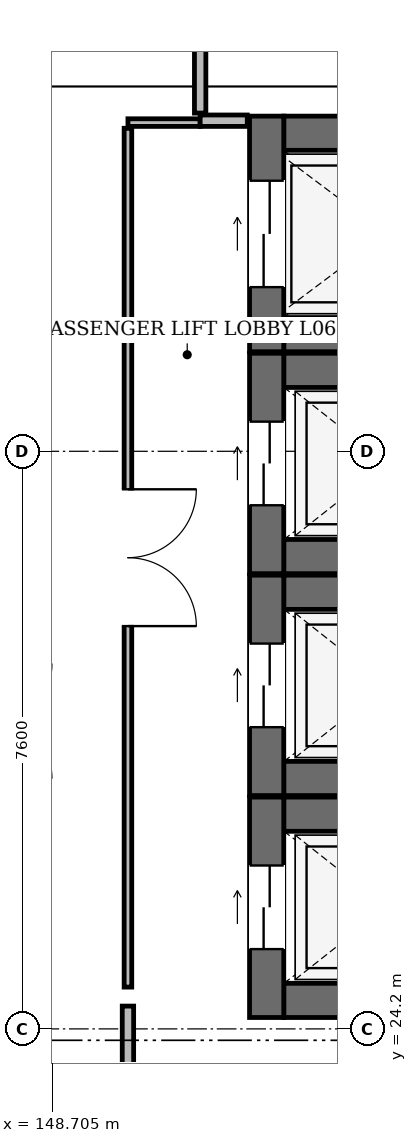
"""IFC4 building model, lengths in metres.
Left out: names, types, materials, properties, quantities, classifications, styles, units other than length and angle.
Written with IfcOpenShell. Run it as: python <this file> out.ifc"""

import sys

from ifc_helpers import new_model, si_unit, direction, frame, frame_2d, origin, place, context, subcontext, project, spatial, rectangle, extrude, element, fill, save


model = new_model("IFC4")
c1 = context("Model", 3, precision=1e-05, world=origin(), true_north=direction((0.0, 1.0)))
c2 = subcontext(c1, "Body", "Model", "MODEL_VIEW")
j1 = project(units=[si_unit("LENGTHUNIT", "METRE"), si_unit("PLANEANGLEUNIT", "RADIAN")], contexts=[c1])
p1 = place(None, origin())
s1 = spatial("IfcSite", under=j1, at=p1, CompositionType="ELEMENT")
p2 = place(p1, origin())
s2 = spatial("IfcBuilding", under=s1, at=p2, CompositionType="ELEMENT")
p3 = place(p2, frame((0.0, 0.0, 28.2)))
s3 = spatial("IfcBuildingStorey", under=s2, at=p3, CompositionType="ELEMENT", Elevation=28.2)
for number, where, z_axis, x_axis in (
    (1, (151.75, 24.575, 0.0), (0.0, 0.0, 1.0), (1.0, 0.0, 0.0)),
    (2, (151.75, 27.025, 0.0), (0.0, 0.0, 1.0), (1.0, 0.0, 0.0)),
):
    element("IfcWall", number, at=place(p3, frame(where, z_axis=z_axis, x_axis=x_axis)), inside=s3, PredefinedType="SHEAR", context=c2, shape_type="SweptSolid", body=[
        extrude(rectangle(XDim=2.7, YDim=0.45, at=frame_2d((1.35, 0.0))), origin(), (0.0, 0.0, 1.0), 3.94),
    ])
p4 = place(p3, frame((151.525, 24.35, 0.0), z_axis=(0.0, 0.0, 1.0), x_axis=(0.0, 1.0, 0.0)))
e3 = element("IfcWall", 3, at=p4, inside=s3, PredefinedType="SHEAR", context=c2, shape_type="SweptSolid", body=[
    extrude(rectangle(XDim=2.9, YDim=0.45, at=frame_2d((1.45, 0.0))), origin(), (0.0, 0.0, 1.0), 3.94),
])
p5 = place(p4, frame((0.9, 0.0, 0.0)))
e4 = element("IfcOpeningElement", 4, at=p5, cuts=e3, PredefinedType="OPENING", context=c2, shape_type="SweptSolid", body=[
    extrude(rectangle(XDim=1.1, YDim=2.2, at=frame_2d((0.55, 1.1))), frame((0.0, 0.237, 0.0), z_axis=(0.0, -1.0, 0.0), x_axis=(1.0, 0.0, 0.0)), (0.0, 0.0, 1.0), 0.474),
])
for number, where, z_axis, x_axis in (
    (5, (151.75, 27.495, 0.0), (0.0, 0.0, 1.0), (1.0, 0.0, 0.0)),
    (6, (151.75, 29.945, 0.0), (0.0, 0.0, 1.0), (1.0, 0.0, 0.0)),
):
    element("IfcWall", number, at=place(p3, frame(where, z_axis=z_axis, x_axis=x_axis)), inside=s3, PredefinedType="SHEAR", context=c2, shape_type="SweptSolid", body=[
        extrude(rectangle(XDim=2.7, YDim=0.45, at=frame_2d((1.35, 0.0))), origin(), (0.0, 0.0, 1.0), 3.94),
    ])
p6 = place(p3, frame((151.525, 27.27, 0.0), z_axis=(0.0, 0.0, 1.0), x_axis=(0.0, 1.0, 0.0)))
e7 = element("IfcWall", 7, at=p6, inside=s3, PredefinedType="SHEAR", context=c2, shape_type="SweptSolid", body=[
    extrude(rectangle(XDim=2.9, YDim=0.45, at=frame_2d((1.45, 0.0))), origin(), (0.0, 0.0, 1.0), 3.94),
])
p7 = place(p6, frame((0.9, 0.0, 0.0)))
e8 = element("IfcOpeningElement", 8, at=p7, cuts=e7, PredefinedType="OPENING", context=c2, shape_type="SweptSolid", body=[
    extrude(rectangle(XDim=1.1, YDim=2.2, at=frame_2d((0.55, 1.1))), frame((0.0, 0.237, 0.0), z_axis=(0.0, -1.0, 0.0), x_axis=(1.0, 0.0, 0.0)), (0.0, 0.0, 1.0), 0.474),
])
for number, where, z_axis, x_axis in (
    (9, (151.75, 30.415, 0.0), (0.0, 0.0, 1.0), (1.0, 0.0, 0.0)),
    (10, (151.75, 32.865, 0.0), (0.0, 0.0, 1.0), (1.0, 0.0, 0.0)),
):
    element("IfcWall", number, at=place(p3, frame(where, z_axis=z_axis, x_axis=x_axis)), inside=s3, PredefinedType="SHEAR", context=c2, shape_type="SweptSolid", body=[
        extrude(rectangle(XDim=2.7, YDim=0.45, at=frame_2d((1.35, 0.0))), origin(), (0.0, 0.0, 1.0), 3.94),
    ])
p8 = place(p3, frame((151.525, 30.19, 0.0), z_axis=(0.0, 0.0, 1.0), x_axis=(0.0, 1.0, 0.0)))
e11 = element("IfcWall", 11, at=p8, inside=s3, PredefinedType="SHEAR", context=c2, shape_type="SweptSolid", body=[
    extrude(rectangle(XDim=2.9, YDim=0.45, at=frame_2d((1.45, 0.0))), origin(), (0.0, 0.0, 1.0), 3.94),
])
p9 = place(p8, frame((0.9, 0.0, 0.0)))
e12 = element("IfcOpeningElement", 12, at=p9, cuts=e11, PredefinedType="OPENING", context=c2, shape_type="SweptSolid", body=[
    extrude(rectangle(XDim=1.1, YDim=2.2, at=frame_2d((0.55, 1.1))), frame((0.0, 0.237, 0.0), z_axis=(0.0, -1.0, 0.0), x_axis=(1.0, 0.0, 0.0)), (0.0, 0.0, 1.0), 0.474),
])
for number, where, z_axis, x_axis in (
    (13, (151.75, 33.335, 0.0), (0.0, 0.0, 1.0), (1.0, 0.0, 0.0)),
    (14, (151.75, 35.985, 0.0), (0.0, 0.0, 1.0), (1.0, 0.0, 0.0)),
):
    element("IfcWall", number, at=place(p3, frame(where, z_axis=z_axis, x_axis=x_axis)), inside=s3, PredefinedType="SHEAR", context=c2, shape_type="SweptSolid", body=[
        extrude(rectangle(XDim=2.7, YDim=0.45, at=frame_2d((1.35, 0.0))), origin(), (0.0, 0.0, 1.0), 3.94),
    ])
p10 = place(p3, frame((151.525, 33.11, 0.0), z_axis=(0.0, 0.0, 1.0), x_axis=(0.0, 1.0, 0.0)))
e15 = element("IfcWall", 15, at=p10, inside=s3, PredefinedType="SHEAR", context=c2, shape_type="SweptSolid", body=[
    extrude(rectangle(XDim=3.1, YDim=0.45, at=frame_2d((1.55, 0.0))), origin(), (0.0, 0.0, 1.0), 3.94),
])
p11 = place(p10, frame((0.85, 0.0, 0.0)))
e16 = element("IfcOpeningElement", 16, at=p11, cuts=e15, PredefinedType="OPENING", context=c2, shape_type="SweptSolid", body=[
    extrude(rectangle(XDim=1.4, YDim=2.3, at=frame_2d((0.7, 1.15))), frame((0.0, 0.237, 0.0), z_axis=(0.0, -1.0, 0.0), x_axis=(1.0, 0.0, 0.0)), (0.0, 0.0, 1.0), 0.474),
])
p12 = place(p3, frame((149.7, 24.75, 0.0), z_axis=(0.0, 0.0, 1.0), x_axis=(0.0, 1.0, 0.0)))
e17 = element("IfcWall", 17, at=p12, inside=s3, PredefinedType="PARTITIONING", context=c2, shape_type="SweptSolid", body=[
    extrude(rectangle(XDim=11.3, YDim=0.1, at=frame_2d((5.65, 0.0))), origin(), (0.0, 0.0, 1.0), 3.805),
])
p13 = place(p12, frame((4.75, 0.0, 0.0)))
e18 = element("IfcOpeningElement", 18, at=p13, cuts=e17, PredefinedType="OPENING", context=c2, shape_type="SweptSolid", body=[
    extrude(rectangle(XDim=1.8, YDim=2.4, at=frame_2d((0.9, 1.2))), frame((0.0, 0.062, 0.0), z_axis=(0.0, -1.0, 0.0), x_axis=(1.0, 0.0, 0.0)), (0.0, 0.0, 1.0), 0.124),
])
p14 = place(p3, frame((149.7, 36.125, 0.0), z_axis=(0.0, 0.0, 1.0), x_axis=(1.0, 0.0, 0.0)))
e19 = element("IfcWall", 19, at=p14, inside=s3, PredefinedType="PARTITIONING", context=c2, shape_type="SweptSolid", body=[
    extrude(rectangle(XDim=0.95, YDim=0.1, at=frame_2d((0.475, 0.0))), origin(), (0.0, 0.0, 1.0), 3.805),
])
p15 = place(p3, frame((150.65, 36.15, 0.0), z_axis=(0.0, 0.0, 1.0), x_axis=(1.0, 0.0, 0.0)))
e20 = element("IfcWall", 20, at=p15, inside=s3, PredefinedType="PARTITIONING", context=c2, shape_type="SweptSolid", body=[
    extrude(rectangle(XDim=0.62, YDim=0.15, at=frame_2d((0.31, 0.0))), origin(), (0.0, 0.0, 1.0), 3.805),
])
p16 = place(p3, frame((149.7, 24.5, 0.0), z_axis=(0.0, 0.0, 1.0), x_axis=(0.0, -1.0, 0.0)))
e21 = element("IfcWall", 21, at=p16, inside=s3, PredefinedType="PARTITIONING", context=c2, shape_type="SweptSolid", body=[
    extrude(rectangle(XDim=0.8, YDim=0.15, at=frame_2d((0.4, 0.0))), origin(), (0.0, 0.0, 1.0), 3.805),
])
p17 = place(p3, frame((150.65, 62.2, 0.0), z_axis=(0.0, 0.0, 1.0), x_axis=(0.0, -1.0, 0.0)))
e22 = element("IfcWall", 22, at=p17, inside=s3, PredefinedType="PARTITIONING", context=c2, shape_type="SweptSolid", body=[
    extrude(rectangle(XDim=25.95, YDim=0.15, at=frame_2d((12.975, 0.0))), origin(), (0.0, 0.0, 1.0), 3.805),
])
p18 = place(p17, frame((12.275, 0.0, 0.0)))
e23 = element("IfcOpeningElement", 23, at=p18, cuts=e22, PredefinedType="OPENING", context=c2, shape_type="SweptSolid", body=[
    extrude(rectangle(XDim=1.4, YDim=2.2, at=frame_2d((0.7, 1.1))), frame((0.0, 0.087, 0.0), z_axis=(0.0, -1.0, 0.0), x_axis=(1.0, 0.0, 0.0)), (0.0, 0.0, 1.0), 0.174),
])
p19 = place(p5, origin())
e24 = element("IfcDoor", 24, at=p19, inside=s3, OperationType="DOUBLE_DOOR_SLIDING", PredefinedType="DOOR", context=c2, shape_type="SweptSolid", body=[
    extrude(rectangle(XDim=1.1, YDim=2.2, at=frame_2d((0.55, 1.1))), frame((0.0, 0.025, 0.0), z_axis=(0.0, -1.0, 0.0), x_axis=(1.0, 0.0, 0.0)), (0.0, 0.0, 1.0), 0.05),
])
fill(e4, e24)
p20 = place(p7, origin())
e25 = element("IfcDoor", 25, at=p20, inside=s3, OperationType="DOUBLE_DOOR_SLIDING", PredefinedType="DOOR", context=c2, shape_type="SweptSolid", body=[
    extrude(rectangle(XDim=1.1, YDim=2.2, at=frame_2d((0.55, 1.1))), frame((0.0, 0.025, 0.0), z_axis=(0.0, -1.0, 0.0), x_axis=(1.0, 0.0, 0.0)), (0.0, 0.0, 1.0), 0.05),
])
fill(e8, e25)
p21 = place(p9, origin())
e26 = element("IfcDoor", 26, at=p21, inside=s3, OperationType="DOUBLE_DOOR_SLIDING", PredefinedType="DOOR", context=c2, shape_type="SweptSolid", body=[
    extrude(rectangle(XDim=1.1, YDim=2.2, at=frame_2d((0.55, 1.1))), frame((0.0, 0.025, 0.0), z_axis=(0.0, -1.0, 0.0), x_axis=(1.0, 0.0, 0.0)), (0.0, 0.0, 1.0), 0.05),
])
fill(e12, e26)
p22 = place(p11, origin())
e27 = element("IfcDoor", 27, at=p22, inside=s3, OperationType="DOUBLE_DOOR_SLIDING", PredefinedType="DOOR", context=c2, shape_type="SweptSolid", body=[
    extrude(rectangle(XDim=1.4, YDim=2.3, at=frame_2d((0.7, 1.15))), frame((0.0, 0.025, 0.0), z_axis=(0.0, -1.0, 0.0), x_axis=(1.0, 0.0, 0.0)), (0.0, 0.0, 1.0), 0.05),
])
fill(e16, e27)
p23 = place(p13, frame((1.8, 0.0, 0.0), z_axis=(0.0, 0.0, 1.0), x_axis=(-1.0, 0.0, 0.0)))
e28 = element("IfcDoor", 28, at=p23, inside=s3, OperationType="DOUBLE_DOOR_SINGLE_SWING", PredefinedType="DOOR", context=c2, shape_type="SweptSolid", body=[
    extrude(rectangle(XDim=1.8, YDim=2.4, at=frame_2d((0.9, 1.2))), frame((0.0, 0.025, 0.0), z_axis=(0.0, -1.0, 0.0), x_axis=(1.0, 0.0, 0.0)), (0.0, 0.0, 1.0), 0.05),
])
fill(e18, e28)
save(model, sys.argv[1])
